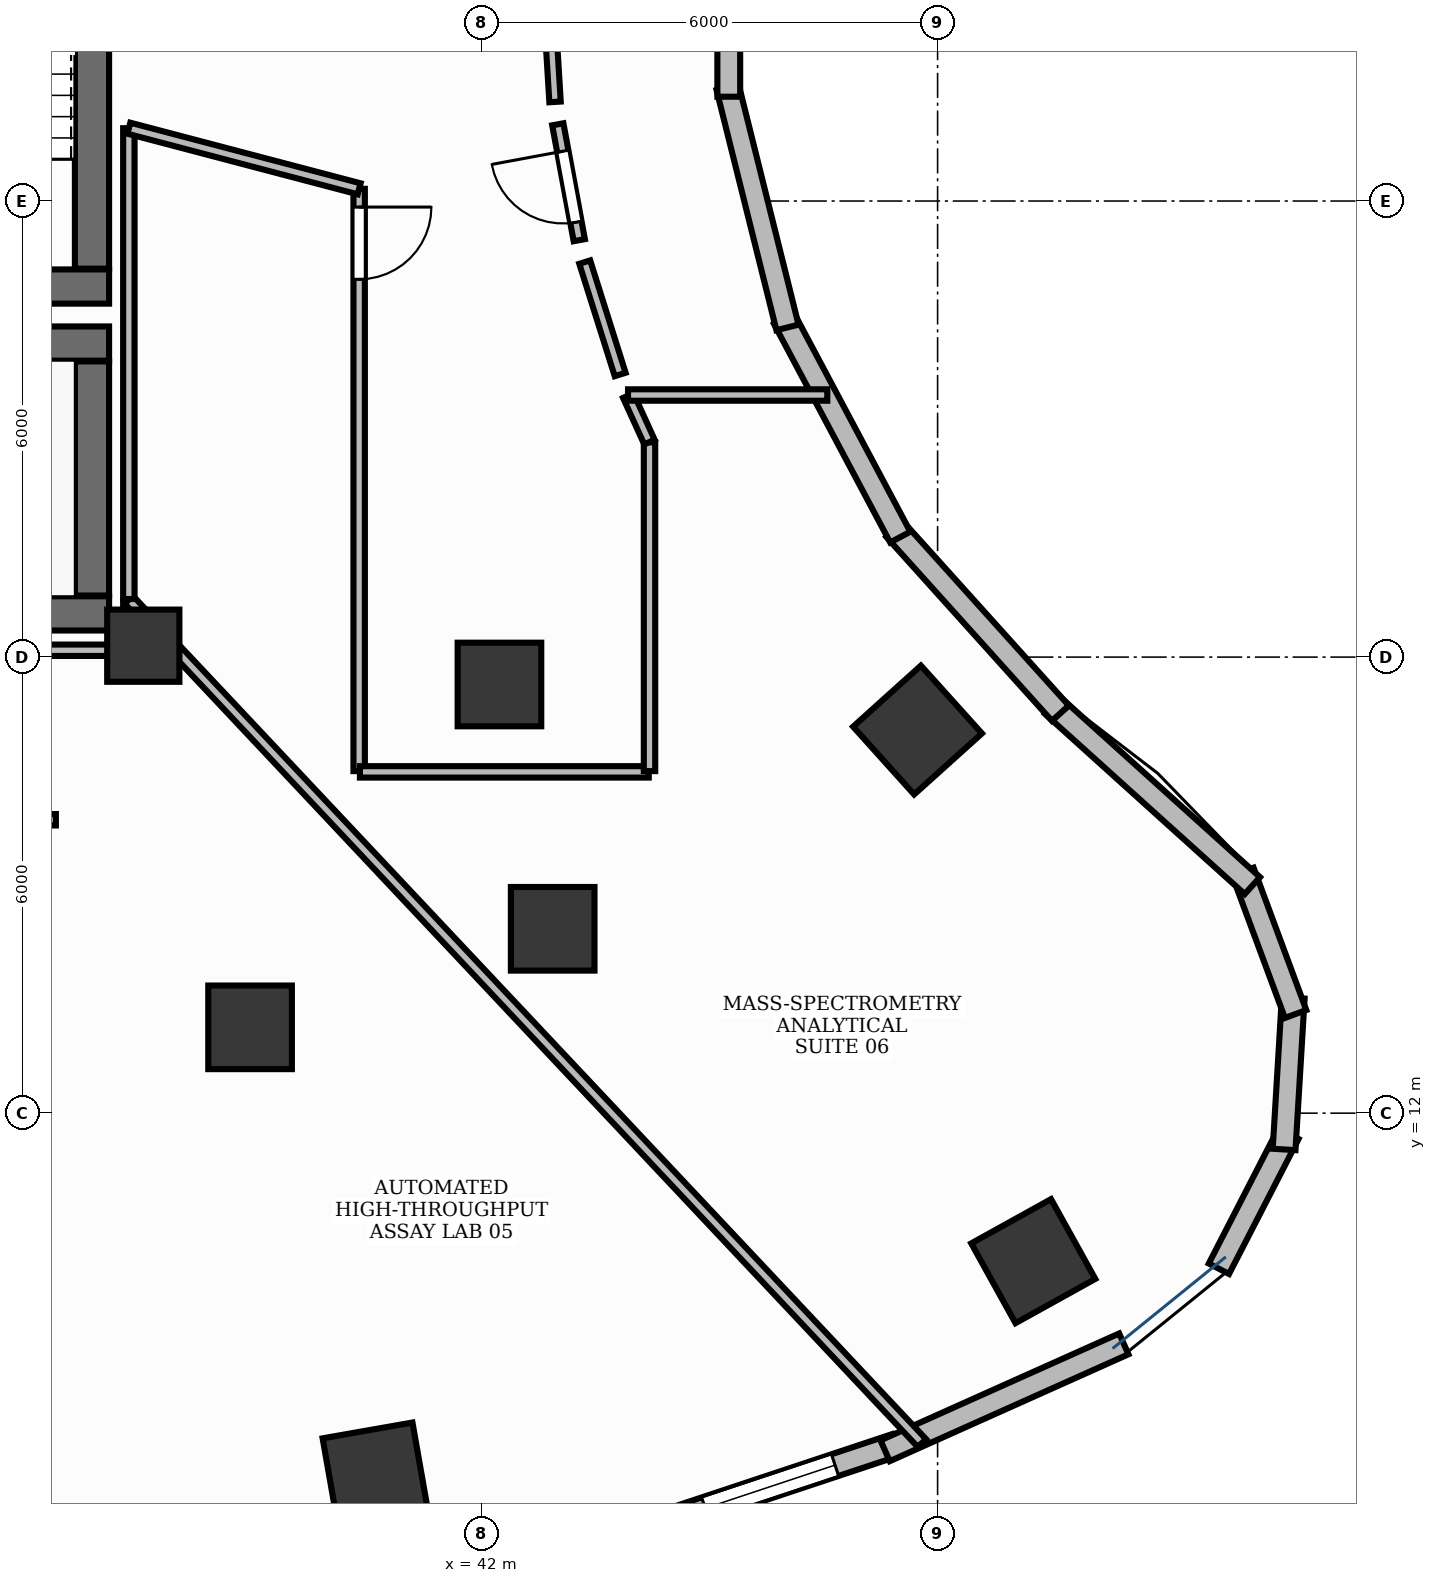
"""IFC4 building model, lengths in metres.
Left out: names, types, materials, properties, quantities, classifications, styles, units other than length and angle.
Written with IfcOpenShell. Run it as: python <this file> out.ifc"""

import sys

from ifc_helpers import new_model, si_unit, direction, frame, frame_2d, origin, origin_2d, place, context, subcontext, project, spatial, rectangle, extrude, element, fill, save


model = new_model("IFC4")
c1 = context("Model", 3, precision=1e-05, world=origin(), true_north=direction((0.0, 1.0)))
c2 = subcontext(c1, "Body", "Model", "MODEL_VIEW")
j1 = project(units=[si_unit("LENGTHUNIT", "METRE"), si_unit("PLANEANGLEUNIT", "RADIAN")], contexts=[c1])
p1 = place(None, origin())
s1 = spatial("IfcSite", under=j1, at=p1, CompositionType="ELEMENT")
p2 = place(p1, origin())
s2 = spatial("IfcBuilding", under=s1, at=p2, CompositionType="ELEMENT")
p3 = place(p2, frame((0.0, 0.0, 111.0)))
s3 = spatial("IfcBuildingStorey", under=s2, at=p3, CompositionType="ELEMENT", Elevation=111.0)
p4 = place(p3, frame((28.852, 18.575, 0.0), z_axis=(0.0, 0.0, 1.0), x_axis=(1.0, 0.0, 0.0)))
e1 = element("IfcWall", 1, at=p4, inside=s3, PredefinedType="SHEAR", context=c2, shape_type="SweptSolid", body=[
    extrude(rectangle(XDim=8.248, YDim=0.45, at=frame_2d((4.124, 0.0))), origin(), (0.0, 0.0, 1.0), 3.9),
])
p5 = place(p3, frame((28.35, 22.125, 0.0), z_axis=(0.0, 0.0, 1.0), x_axis=(1.0, 0.0, 0.0)))
e2 = element("IfcWall", 2, at=p5, inside=s3, PredefinedType="SHEAR", context=c2, shape_type="SweptSolid", body=[
    extrude(rectangle(XDim=8.75, YDim=0.45, at=frame_2d((4.375, 0.0))), origin(), (0.0, 0.0, 1.0), 3.9),
])
p6 = place(p3, frame((36.875, 18.81, 0.0), z_axis=(0.0, 0.0, 1.0), x_axis=(0.0, 1.0, 0.0)))
e3 = element("IfcWall", 3, at=p6, inside=s3, PredefinedType="SHEAR", context=c2, shape_type="SweptSolid", body=[
    extrude(rectangle(XDim=3.08, YDim=0.45, at=frame_2d((1.54, 0.0))), origin(), (0.0, 0.0, 1.0), 3.9),
])
p7 = place(p3, frame((33.1, 22.875, 0.0), z_axis=(0.0, 0.0, 1.0), x_axis=(1.0, 0.0, 0.0)))
e4 = element("IfcWall", 4, at=p7, inside=s3, PredefinedType="SHEAR", context=c2, shape_type="SweptSolid", body=[
    extrude(rectangle(XDim=4.0, YDim=0.45, at=frame_2d((2.0, 0.0))), origin(), (0.0, 0.0, 1.0), 3.9),
])
p8 = place(p3, frame((36.875, 23.11, 0.0), z_axis=(0.0, 0.0, 1.0), x_axis=(0.0, 1.0, 0.0)))
e5 = element("IfcWall", 5, at=p8, inside=s3, PredefinedType="SHEAR", context=c2, shape_type="SweptSolid", body=[
    extrude(rectangle(XDim=7.78, YDim=0.45, at=frame_2d((3.89, 0.0))), origin(), (0.0, 0.0, 1.0), 3.9),
])
p9 = place(p3, frame((37.55, 18.15, -0.0), z_axis=(0.0, 0.0, 1.0), x_axis=(1.0, 0.0, 0.0)))
e6 = element("IfcColumn", 6, at=p9, inside=s3, PredefinedType="PILASTER", context=c2, shape_type="SweptSolid", body=[
    extrude(rectangle(XDim=0.95, YDim=0.95, at=origin_2d()), origin(), (0.0, 0.0, 1.0), 3.901),
])
p10 = place(p3, frame((40.604, 7.235, -0.0), z_axis=(0.0, 0.0, 1.0), x_axis=(0.984868307662, 0.173304404339, 0.0)))
e7 = element("IfcColumn", 7, at=p10, inside=s3, PredefinedType="COLUMN", context=c2, shape_type="SweptSolid", body=[
    extrude(rectangle(XDim=1.2, YDim=1.2, at=origin_2d()), origin(), (0.0, 0.0, 1.0), 3.901),
])
p11 = place(p3, frame((38.955, 13.129, -0.0), z_axis=(0.0, 0.0, 1.0), x_axis=(1.0, 0.0, 0.0)))
e8 = element("IfcColumn", 8, at=p11, inside=s3, PredefinedType="COLUMN", context=c2, shape_type="SweptSolid", body=[
    extrude(rectangle(XDim=1.1, YDim=1.1, at=origin_2d()), origin(), (0.0, 0.0, 1.0), 3.901),
])
p12 = place(p3, frame((49.259, 10.053, -0.0), z_axis=(0.0, 0.0, 1.0), x_axis=(0.874535078577, 0.484962262797, 0.0)))
e9 = element("IfcColumn", 9, at=p12, inside=s3, PredefinedType="COLUMN", context=c2, shape_type="SweptSolid", body=[
    extrude(rectangle(XDim=1.2, YDim=1.2, at=origin_2d()), origin(), (0.0, 0.0, 1.0), 3.901),
])
p13 = place(p3, frame((42.936, 14.425, -0.0), z_axis=(0.0, 0.0, 1.0), x_axis=(1.0, 0.0, 0.0)))
e10 = element("IfcColumn", 10, at=p13, inside=s3, PredefinedType="COLUMN", context=c2, shape_type="SweptSolid", body=[
    extrude(rectangle(XDim=1.1, YDim=1.1, at=origin_2d()), origin(), (0.0, 0.0, 1.0), 3.901),
])
p14 = place(p3, frame((47.736, 17.04, -0.0), z_axis=(0.0, 0.0, 1.0), x_axis=(-0.669130606359, 0.743144825477, 0.0)))
e11 = element("IfcColumn", 11, at=p14, inside=s3, PredefinedType="COLUMN", context=c2, shape_type="SweptSolid", body=[
    extrude(rectangle(XDim=1.2, YDim=1.2, at=origin_2d()), origin(), (0.0, 0.0, 1.0), 3.901),
])
p15 = place(p3, frame((42.236, 17.639, -0.0), z_axis=(0.0, 0.0, 1.0), x_axis=(1.0, 0.0, 0.0)))
e12 = element("IfcColumn", 12, at=p15, inside=s3, PredefinedType="COLUMN", context=c2, shape_type="SweptSolid", body=[
    extrude(rectangle(XDim=1.1, YDim=1.1, at=origin_2d()), origin(), (0.0, 0.0, 1.0), 3.901),
])
p16 = place(p3, frame((44.147, 6.538, 0.0), z_axis=(0.0, 0.0, 1.0), x_axis=(0.948949854506, 0.315426970364, 0.0)))
e13 = element("IfcWall", 13, at=p16, inside=s3, PredefinedType="STANDARD", context=c2, shape_type="SweptSolid", body=[
    extrude(rectangle(XDim=3.476, YDim=0.3, at=frame_2d((1.738, 0.0))), origin(), (0.0, 0.0, 1.0), 3.9),
])
p17 = place(p16, frame((0.838, 0.0, 0.9)))
e14 = element("IfcOpeningElement", 14, at=p17, cuts=e13, PredefinedType="OPENING", context=c2, shape_type="SweptSolid", body=[
    extrude(rectangle(XDim=1.8, YDim=2.1, at=frame_2d((0.9, 1.05))), frame((0.0, 0.165, 0.0), z_axis=(0.0, -1.0, 0.0), x_axis=(1.0, 0.0, 0.0)), (0.0, 0.0, 1.0), 0.33),
])
p18 = place(p3, frame((47.309, 7.559, 0.0), z_axis=(0.0, 0.0, 1.0), x_axis=(0.912672725317, 0.408691199395, 0.0)))
e15 = element("IfcWall", 15, at=p18, inside=s3, PredefinedType="STANDARD", context=c2, shape_type="SweptSolid", body=[
    extrude(rectangle(XDim=3.441, YDim=0.3, at=frame_2d((1.72, 0.0))), origin(), (0.0, 0.0, 1.0), 3.9),
])
for number, where, z_axis, x_axis in (
    (16, (51.701, 9.953, 0.0), (0.0, 0.0, 1.0), (0.458, 0.889, 0.0)),
    (17, (52.559, 11.523, 0.0), (0.0, 0.0, 1.0), (0.06, 0.998, 0.0)),
):
    element("IfcWall", number, at=place(p3, frame(where, z_axis=z_axis, x_axis=x_axis)), inside=s3, PredefinedType="STANDARD", context=c2, shape_type="SweptSolid", body=[
        extrude(rectangle(XDim=1.998, YDim=0.3, at=frame_2d((0.999, 0.0))), origin(), (0.0, 0.0, 1.0), 3.9),
    ])
p19 = place(p3, frame((52.71, 13.305, 0.0), z_axis=(0.0, 0.0, 1.0), x_axis=(-0.347370087337, 0.937728117539, 0.0)))
e18 = element("IfcWall", 18, at=p19, inside=s3, PredefinedType="STANDARD", context=c2, shape_type="SweptSolid", body=[
    extrude(rectangle(XDim=1.997, YDim=0.3, at=frame_2d((0.999, 0.0))), origin(), (0.0, 0.0, 1.0), 3.9),
])
p20 = place(p3, frame((52.141, 14.994, 0.0), z_axis=(0.0, 0.0, 1.0), x_axis=(-0.74255963233, 0.669779958221, 0.0)))
e19 = element("IfcWall", 19, at=p20, inside=s3, PredefinedType="STANDARD", context=c2, shape_type="SweptSolid", body=[
    extrude(rectangle(XDim=3.539, YDim=0.3, at=frame_2d((1.77, 0.0))), origin(), (0.0, 0.0, 1.0), 3.9),
])
p21 = place(p3, frame((49.616, 17.262, 0.0), z_axis=(0.0, 0.0, 1.0), x_axis=(-0.669167727967, 0.743111399353, 0.0)))
e20 = element("IfcWall", 20, at=p21, inside=s3, PredefinedType="STANDARD", context=c2, shape_type="SweptSolid", body=[
    extrude(rectangle(XDim=3.255, YDim=0.3, at=frame_2d((1.628, 0.0))), origin(), (0.0, 0.0, 1.0), 3.9),
])
p22 = place(p3, frame((47.509, 19.579, 0.0), z_axis=(0.0, 0.0, 1.0), x_axis=(-0.469451284634, 0.882958374645, 0.0)))
e21 = element("IfcWall", 21, at=p22, inside=s3, PredefinedType="STANDARD", context=c2, shape_type="SweptSolid", body=[
    extrude(rectangle(XDim=3.256, YDim=0.3, at=frame_2d((1.628, 0.0))), origin(), (0.0, 0.0, 1.0), 3.9),
])
p23 = place(p3, frame((46.025, 22.337, 0.0), z_axis=(0.0, 0.0, 1.0), x_axis=(-0.241900409149, 0.970301083197, 0.0)))
e22 = element("IfcWall", 22, at=p23, inside=s3, PredefinedType="STANDARD", context=c2, shape_type="SweptSolid", body=[
    extrude(rectangle(XDim=3.256, YDim=0.3, at=frame_2d((1.628, 0.0))), origin(), (0.0, 0.0, 1.0), 3.9),
])
p24 = place(p3, frame((45.253, 25.372, 0.0), z_axis=(0.0, 0.0, 1.0), x_axis=(0.0, 1.0, 0.0)))
e23 = element("IfcWall", 23, at=p24, inside=s3, PredefinedType="STANDARD", context=c2, shape_type="SweptSolid", body=[
    extrude(rectangle(XDim=3.255, YDim=0.3, at=frame_2d((1.628, 0.0))), origin(), (0.0, 0.0, 1.0), 3.9),
])
p25 = place(p3, frame((36.4, 15.86, 0.0), z_axis=(0.0, 0.0, 1.0), x_axis=(-1.0, 0.0, 0.0)))
e24 = element("IfcWall", 24, at=p25, inside=s3, PredefinedType="PARTITIONING", context=c2, shape_type="SweptSolid", body=[
    extrude(rectangle(XDim=2.94, YDim=0.15, at=frame_2d((1.47, 0.0))), origin(), (0.0, 0.0, 1.0), 2.91),
])
p26 = place(p25, frame((1.75, 0.0, 0.0)))
e25 = element("IfcOpeningElement", 25, at=p26, cuts=e24, PredefinedType="OPENING", context=c2, shape_type="SweptSolid", body=[
    extrude(rectangle(XDim=0.95, YDim=2.15, at=frame_2d((0.475, 1.075))), frame((0.0, 0.09, 0.0), z_axis=(0.0, -1.0, 0.0), x_axis=(1.0, 0.0, 0.0)), (0.0, 0.0, 1.0), 0.18),
])
p27 = place(p3, frame((40.39, 24.161, 0.0), z_axis=(0.0, 0.0, 1.0), x_axis=(0.0, -1.0, 0.0)))
e26 = element("IfcWall", 26, at=p27, inside=s3, PredefinedType="PARTITIONING", context=c2, shape_type="SweptSolid", body=[
    extrude(rectangle(XDim=7.661, YDim=0.15, at=frame_2d((3.83, 0.0))), origin(), (0.0, 0.0, 1.0), 2.91),
])
p28 = place(p27, frame((0.24, 0.0, 0.0)))
e27 = element("IfcOpeningElement", 27, at=p28, cuts=e26, PredefinedType="OPENING", context=c2, shape_type="SweptSolid", body=[
    extrude(rectangle(XDim=0.95, YDim=2.15, at=frame_2d((0.475, 1.075))), frame((0.0, 0.09, 0.0), z_axis=(0.0, -1.0, 0.0), x_axis=(1.0, 0.0, 0.0)), (0.0, 0.0, 1.0), 0.18),
])
p29 = place(p3, frame((43.286, 23.485, 0.0), z_axis=(0.0, 0.0, 1.0), x_axis=(-0.182168192784, 0.983267384559, 0.0)))
e28 = element("IfcWall", 28, at=p29, inside=s3, PredefinedType="PARTITIONING", context=c2, shape_type="SweptSolid", body=[
    extrude(rectangle(XDim=1.551, YDim=0.15, at=frame_2d((0.775, 0.0))), origin(), (0.0, 0.0, 1.0), 2.91),
])
p30 = place(p29, frame((0.24, 0.0, 0.0)))
e29 = element("IfcOpeningElement", 29, at=p30, cuts=e28, PredefinedType="OPENING", context=c2, shape_type="SweptSolid", body=[
    extrude(rectangle(XDim=0.95, YDim=2.15, at=frame_2d((0.475, 1.075))), frame((0.0, 0.09, 0.0), z_axis=(0.0, -1.0, 0.0), x_axis=(1.0, 0.0, 0.0)), (0.0, 0.0, 1.0), 0.18),
])
p31 = place(p3, frame((36.501, 5.181, 0.0), z_axis=(0.0, 0.0, 1.0), x_axis=(-0.301258675819, 0.953542453299, 0.0)))
e30 = element("IfcWall", 30, at=p31, inside=s3, PredefinedType="PARTITIONING", context=c2, shape_type="SweptSolid", body=[
    extrude(rectangle(XDim=2.203, YDim=0.15, at=frame_2d((1.101, 0.0))), origin(), (0.0, 0.0, 1.0), 2.91),
])
p32 = place(p3, frame((33.46, 18.09, 0.0), z_axis=(0.0, 0.0, 1.0), x_axis=(1.0, 0.0, 0.0)))
e31 = element("IfcWall", 31, at=p32, inside=s3, PredefinedType="PARTITIONING", context=c2, shape_type="SweptSolid", body=[
    extrude(rectangle(XDim=3.89, YDim=0.15, at=frame_2d((1.945, 0.0))), origin(), (0.0, 0.0, 1.0), 2.91),
])
p33 = place(p3, frame((37.36, 18.1, 0.0), z_axis=(0.0, 0.0, 1.0), x_axis=(0.0, 1.0, 0.0)))
e32 = element("IfcWall", 32, at=p33, inside=s3, PredefinedType="PARTITIONING", context=c2, shape_type="SweptSolid", body=[
    extrude(rectangle(XDim=0.654, YDim=0.15, at=frame_2d((0.327, 0.0))), origin(), (0.0, 0.0, 1.0), 2.91),
])
p34 = place(p3, frame((37.36, 18.754, 0.0), z_axis=(0.0, 0.0, 1.0), x_axis=(0.685084120628, -0.72846396456, 0.0)))
e33 = element("IfcWall", 33, at=p34, inside=s3, PredefinedType="PARTITIONING", context=c2, shape_type="SweptSolid", body=[
    extrude(rectangle(XDim=15.229, YDim=0.15, at=frame_2d((7.615, 0.0))), origin(), (0.0, 0.0, 1.0), 2.91),
])
p35 = place(p3, frame((40.4, 16.49, 0.0), z_axis=(0.0, 0.0, 1.0), x_axis=(1.0, 0.0, 0.0)))
e34 = element("IfcWall", 34, at=p35, inside=s3, PredefinedType="PARTITIONING", context=c2, shape_type="SweptSolid", body=[
    extrude(rectangle(XDim=3.8, YDim=0.15, at=frame_2d((1.9, 0.0))), origin(), (0.0, 0.0, 1.0), 2.91),
])
p36 = place(p3, frame((44.21, 16.5, 0.0), z_axis=(0.0, 0.0, 1.0), x_axis=(0.0, 1.0, 0.0)))
e35 = element("IfcWall", 35, at=p36, inside=s3, PredefinedType="PARTITIONING", context=c2, shape_type="SweptSolid", body=[
    extrude(rectangle(XDim=4.325, YDim=0.15, at=frame_2d((2.163, 0.0))), origin(), (0.0, 0.0, 1.0), 2.91),
])
p37 = place(p3, frame((44.209, 20.829, 0.0), z_axis=(0.0, 0.0, 1.0), x_axis=(-0.414377467152, 0.910105111905, 0.0)))
e36 = element("IfcWall", 36, at=p37, inside=s3, PredefinedType="PARTITIONING", context=c2, shape_type="SweptSolid", body=[
    extrude(rectangle(XDim=0.672, YDim=0.15, at=frame_2d((0.336, 0.0))), origin(), (0.0, 0.0, 1.0), 2.91),
])
p38 = place(p3, frame((43.927, 21.448, 0.0), z_axis=(0.0, 0.0, 1.0), x_axis=(1.0, 0.0, 0.0)))
e37 = element("IfcWall", 37, at=p38, inside=s3, PredefinedType="PARTITIONING", context=c2, shape_type="SweptSolid", body=[
    extrude(rectangle(XDim=2.621, YDim=0.15, at=frame_2d((1.311, 0.0))), origin(), (0.0, 0.0, 1.0), 2.91),
])
p39 = place(p3, frame((37.36, 18.764, 0.0), z_axis=(0.0, 0.0, 1.0), x_axis=(0.0, 1.0, 0.0)))
e38 = element("IfcWall", 38, at=p39, inside=s3, PredefinedType="PARTITIONING", context=c2, shape_type="SweptSolid", body=[
    extrude(rectangle(XDim=6.194, YDim=0.15, at=frame_2d((3.097, 0.0))), origin(), (0.0, 0.0, 1.0), 2.91),
])
p40 = place(p3, frame((37.36, 24.958, 0.0), z_axis=(0.0, 0.0, 1.0), x_axis=(0.967070499487, -0.254508642331, 0.0)))
e39 = element("IfcWall", 39, at=p40, inside=s3, PredefinedType="PARTITIONING", context=c2, shape_type="SweptSolid", body=[
    extrude(rectangle(XDim=3.133, YDim=0.15, at=frame_2d((1.566, 0.0))), origin(), (0.0, 0.0, 1.0), 2.91),
])
for number, where, z_axis, x_axis in (
    (40, (43.824, 21.718, 0.0), (0.0, 0.0, 1.0), (-0.301, 0.954, 0.0)),
    (41, (42.967, 25.304, 0.0), (0.0, 0.0, 1.0), (-0.061, 0.998, 0.0)),
):
    element("IfcWall", number, at=place(p3, frame(where, z_axis=z_axis, x_axis=x_axis)), inside=s3, PredefinedType="PARTITIONING", context=c2, shape_type="SweptSolid", body=[
        extrude(rectangle(XDim=1.55, YDim=0.15, at=frame_2d((0.775, 0.0))), origin(), (0.0, 0.0, 1.0), 2.91),
    ])
p41 = place(p17, origin())
e42 = element("IfcWindow", 42, at=p41, inside=s3, PartitioningType="SINGLE_PANEL", PredefinedType="WINDOW", context=c2, shape_type="SweptSolid", body=[
    extrude(rectangle(XDim=1.8, YDim=2.1, at=frame_2d((0.9, 1.05))), frame((0.0, 0.03, 0.0), z_axis=(0.0, -1.0, 0.0), x_axis=(1.0, 0.0, 0.0)), (0.0, 0.0, 1.0), 0.06),
])
fill(e14, e42)
p42 = place(p28, origin())
e43 = element("IfcDoor", 43, at=p42, inside=s3, OperationType="SINGLE_SWING_LEFT", PredefinedType="DOOR", context=c2, shape_type="SweptSolid", body=[
    extrude(rectangle(XDim=0.95, YDim=2.15, at=frame_2d((0.475, 1.075))), frame((0.0, 0.025, 0.0), z_axis=(0.0, -1.0, 0.0), x_axis=(1.0, 0.0, 0.0)), (0.0, 0.0, 1.0), 0.05),
])
fill(e27, e43)
p43 = place(p30, origin())
e44 = element("IfcDoor", 44, at=p43, inside=s3, OperationType="SINGLE_SWING_RIGHT", PredefinedType="DOOR", context=c2, shape_type="SweptSolid", body=[
    extrude(rectangle(XDim=0.95, YDim=2.15, at=frame_2d((0.475, 1.075))), frame((0.0, 0.025, 0.0), z_axis=(0.0, -1.0, 0.0), x_axis=(1.0, 0.0, 0.0)), (0.0, 0.0, 1.0), 0.05),
])
fill(e29, e44)
save(model, sys.argv[1])
